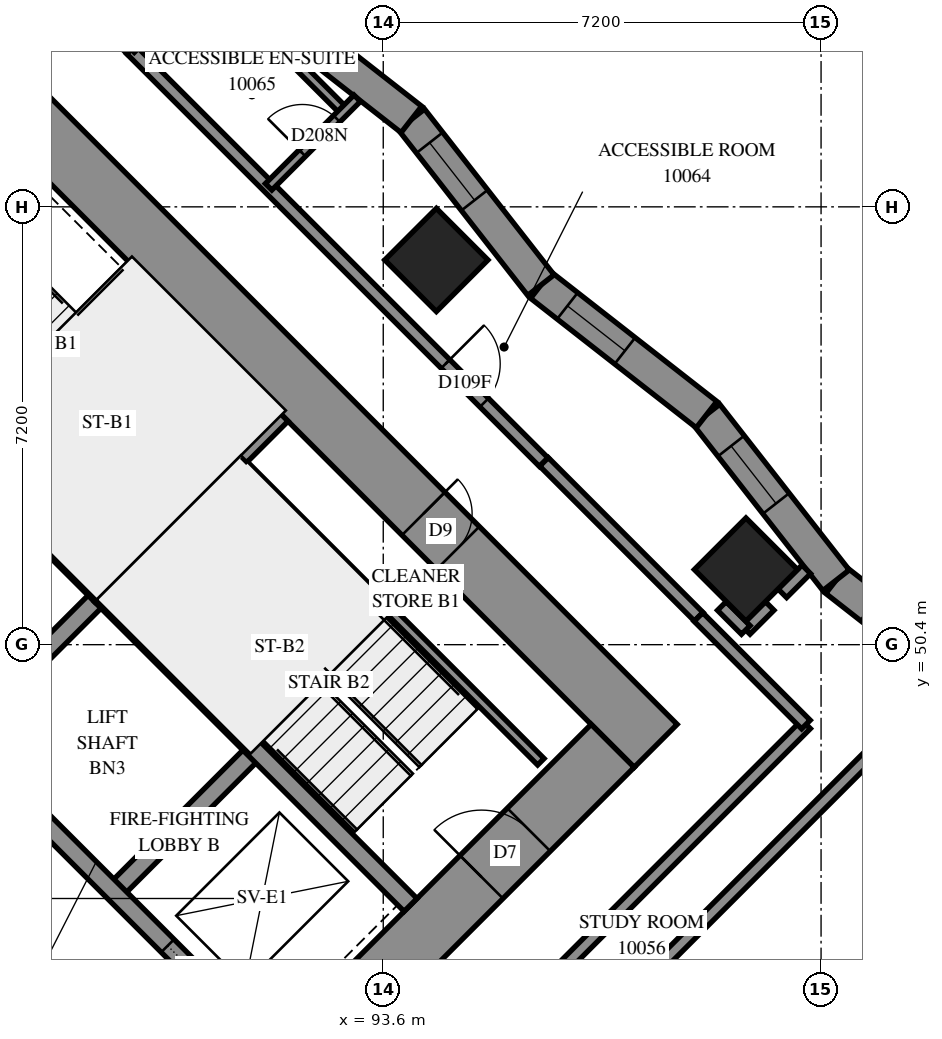
"""IFC4 building model, lengths in metres.
Left out: names, types, materials, properties, quantities, classifications, styles, units other than length and angle.
Written with IfcOpenShell. Run it as: python <this file> out.ifc"""

import sys

from ifc_helpers import new_model, si_unit, direction, frame, frame_2d, origin, origin_2d, place, context, subcontext, project, spatial, polyline, rectangle, outline, extrude, element, fill, save


model = new_model("IFC4")
c1 = context("Model", 3, precision=1e-05, world=origin(), true_north=direction((0.0, 1.0)))
c2 = subcontext(c1, "Body", "Model", "MODEL_VIEW")
j1 = project(units=[si_unit("LENGTHUNIT", "METRE"), si_unit("PLANEANGLEUNIT", "RADIAN")], contexts=[c1])
p1 = place(None, origin())
s1 = spatial("IfcSite", under=j1, at=p1, CompositionType="ELEMENT")
p2 = place(p1, origin())
s2 = spatial("IfcBuilding", under=s1, at=p2, CompositionType="ELEMENT")
p3 = place(p2, frame((0.0, 0.0, 40.6)))
s3 = spatial("IfcBuildingStorey", under=s2, at=p3, CompositionType="ELEMENT", Elevation=40.6)
for number, where, z_axis, x_axis in (
    (1, (94.474, 56.727, 0.0), (0.0, 0.0, 1.0), (0.707, -0.707, 0.0)),
    (2, (99.565, 51.635, 0.0), (0.0, 0.0, 1.0), (0.707, -0.707, 0.0)),
):
    element("IfcColumn", number, at=place(p3, frame(where, z_axis=z_axis, x_axis=x_axis)), inside=s3, PredefinedType="COLUMN", context=c2, shape_type="SweptSolid", body=[
        extrude(rectangle(XDim=1.2, YDim=1.2, at=origin_2d()), origin(), (0.0, 0.0, 1.0), 3.1),
    ])
p4 = place(p3, frame((86.483, 60.333, -0.3), z_axis=(0.0, 0.0, 1.0), x_axis=(0.70710983, -0.7071037324, 0.0)))
e3 = element("IfcWall", 3, at=p4, inside=s3, PredefinedType="SHEAR", context=c2, shape_type="SweptSolid", body=[
    extrude(rectangle(XDim=16.4, YDim=1.0, at=frame_2d((8.2, 0.0))), origin(), (0.0, 0.0, 1.0), 2.7),
])
p5 = place(p4, frame((11.0, 0.0, 0.3)))
e4 = element("IfcOpeningElement", 4, at=p5, cuts=e3, PredefinedType="OPENING", context=c2, shape_type="SweptSolid", body=[
    extrude(rectangle(XDim=0.8, YDim=2.1, at=frame_2d((0.4, 1.05))), frame((0.0, 0.51, 0.0), z_axis=(0.0, -1.0, 0.0), x_axis=(1.0, 0.0, 0.0)), (0.0, 0.0, 1.0), 1.02),
])
p6 = place(p3, frame((87.19, 38.554, -0.3), z_axis=(0.0, 0.0, 1.0), x_axis=(0.707103309, 0.7071102534, 0.0)))
e5 = element("IfcWall", 5, at=p6, inside=s3, PredefinedType="SHEAR", context=c2, shape_type="SweptSolid", body=[
    extrude(rectangle(XDim=14.4, YDim=1.0, at=frame_2d((7.2, 0.0))), origin(), (0.0, 0.0, 1.0), 2.7),
])
p7 = place(p6, frame((4.55, 0.0, 0.3)))
e6 = element("IfcOpeningElement", 6, at=p7, cuts=e5, PredefinedType="OPENING", context=c2, shape_type="SweptSolid", body=[
    extrude(rectangle(XDim=1.1, YDim=2.1, at=frame_2d((0.55, 1.05))), frame((0.0, 0.51, 0.0), z_axis=(0.0, -1.0, 0.0), x_axis=(1.0, 0.0, 0.0)), (0.0, 0.0, 1.0), 1.02),
])
p8 = place(p6, frame((11.35, 0.0, 0.3)))
e7 = element("IfcOpeningElement", 7, at=p8, cuts=e5, PredefinedType="OPENING", context=c2, shape_type="SweptSolid", body=[
    extrude(rectangle(XDim=1.1, YDim=2.1, at=frame_2d((0.55, 1.05))), frame((0.0, 0.51, 0.0), z_axis=(0.0, -1.0, 0.0), x_axis=(1.0, 0.0, 0.0)), (0.0, 0.0, 1.0), 1.02),
])
for number, where, z_axis, x_axis in (
    (8, (86.625, 48.878, 0.0), (0.0, 0.0, 1.0), (0.707, 0.707, 0.0)),
    (9, (89.17, 46.332, 0.0), (0.0, 0.0, 1.0), (0.707, 0.707, 0.0)),
):
    element("IfcWall", number, at=place(p3, frame(where, z_axis=z_axis, x_axis=x_axis)), inside=s3, PredefinedType="SOLIDWALL", context=c2, shape_type="SweptSolid", body=[
        extrude(rectangle(XDim=3.3, YDim=0.3, at=frame_2d((1.65, 0.0))), origin(), (0.0, 0.0, 1.0), 3.1),
    ])
p9 = place(p3, frame((78.988, 51.423, 0.0), z_axis=(0.0, 0.0, 1.0), x_axis=(0.7071067812, -0.7071067812, 0.0)))
e10 = element("IfcWall", 10, at=p9, inside=s3, PredefinedType="SOLIDWALL", context=c2, shape_type="SweptSolid", body=[
    extrude(rectangle(XDim=14.4, YDim=0.3, at=frame_2d((7.2, 0.0))), origin(), (0.0, 0.0, 1.0), 3.1),
])
p10 = place(p9, frame((1.25, 0.0, 0.0)))
e11 = element("IfcOpeningElement", 11, at=p10, cuts=e10, PredefinedType="OPENING", context=c2, shape_type="SweptSolid", body=[
    extrude(rectangle(XDim=1.1, YDim=2.1, at=frame_2d((0.55, 1.05))), frame((0.0, 0.16, 0.0), z_axis=(0.0, -1.0, 0.0), x_axis=(1.0, 0.0, 0.0)), (0.0, 0.0, 1.0), 0.32),
])
p11 = place(p9, frame((4.85, 0.0, 0.0)))
e12 = element("IfcOpeningElement", 12, at=p11, cuts=e10, PredefinedType="OPENING", context=c2, shape_type="SweptSolid", body=[
    extrude(rectangle(XDim=1.1, YDim=2.1, at=frame_2d((0.55, 1.05))), frame((0.0, 0.16, 0.0), z_axis=(0.0, -1.0, 0.0), x_axis=(1.0, 0.0, 0.0)), (0.0, 0.0, 1.0), 0.32),
])
p12 = place(p9, frame((8.45, 0.0, 0.0)))
e13 = element("IfcOpeningElement", 13, at=p12, cuts=e10, PredefinedType="OPENING", context=c2, shape_type="SweptSolid", body=[
    extrude(rectangle(XDim=1.1, YDim=2.1, at=frame_2d((0.55, 1.05))), frame((0.0, 0.16, 0.0), z_axis=(0.0, -1.0, 0.0), x_axis=(1.0, 0.0, 0.0)), (0.0, 0.0, 1.0), 0.32),
])
p13 = place(p9, frame((12.05, 0.0, 0.0)))
e14 = element("IfcOpeningElement", 14, at=p13, cuts=e10, PredefinedType="OPENING", context=c2, shape_type="SweptSolid", body=[
    extrude(rectangle(XDim=1.1, YDim=2.1, at=frame_2d((0.55, 1.05))), frame((0.0, 0.16, 0.0), z_axis=(0.0, -1.0, 0.0), x_axis=(1.0, 0.0, 0.0)), (0.0, 0.0, 1.0), 0.32),
])
p14 = place(p3, frame((81.534, 53.969, 0.0), z_axis=(0.0, 0.0, 1.0), x_axis=(0.707103309, -0.7071102534, 0.0)))
e15 = element("IfcWall", 15, at=p14, inside=s3, PredefinedType="SOLIDWALL", context=c2, shape_type="SweptSolid", body=[
    extrude(rectangle(XDim=14.4, YDim=0.3, at=frame_2d((7.2, 0.0))), origin(), (0.0, 0.0, 1.0), 3.1),
])
p15 = place(p14, frame((12.05, 0.0, 0.0)))
e16 = element("IfcOpeningElement", 16, at=p15, cuts=e15, PredefinedType="OPENING", context=c2, shape_type="SweptSolid", body=[
    extrude(rectangle(XDim=1.1, YDim=2.1, at=frame_2d((0.55, 1.05))), frame((0.0, 0.16, 0.0), z_axis=(0.0, -1.0, 0.0), x_axis=(1.0, 0.0, 0.0)), (0.0, 0.0, 1.0), 0.32),
])
for number, where, z_axis, x_axis in (
    (17, (83.867, 56.302, 0.0), (0.0, 0.0, 1.0), (0.707, -0.707, 0.0)),
    (18, (88.958, 51.211, 0.0), (0.0, 0.0, 1.0), (0.707, -0.707, 0.0)),
):
    element("IfcWall", number, at=place(p3, frame(where, z_axis=z_axis, x_axis=x_axis)), inside=s3, PredefinedType="SOLIDWALL", context=c2, shape_type="SweptSolid", body=[
        extrude(rectangle(XDim=7.2, YDim=0.3, at=frame_2d((3.6, 0.0))), origin(), (0.0, 0.0, 1.0), 3.1),
    ])
p16 = place(p3, frame((88.958, 51.211, 0.0), z_axis=(0.0, 0.0, 1.0), x_axis=(0.7071067812, 0.7071067812, 0.0)))
e19 = element("IfcWall", 19, at=p16, inside=s3, PredefinedType="SOLIDWALL", context=c2, shape_type="SweptSolid", body=[
    extrude(rectangle(XDim=4.2, YDim=0.3, at=frame_2d((2.1, 0.0))), origin(), (0.0, 0.0, 1.0), 3.1),
])
p17 = place(p3, frame((103.771, 49.329, 0.0), z_axis=(0.0, 0.0, 1.0), x_axis=(-0.7879191472, 0.6157787082, 0.0)))
e20 = element("IfcWall", 20, at=p17, inside=s3, PredefinedType="SOLIDWALL", context=c2, shape_type="SweptSolid", body=[
    extrude(outline(polyline([(-0.034, -0.275), (3.425, -0.275), (3.492, 0.275), (0.034, 0.275), (-0.034, -0.275)])), origin(), (0.0, 0.0, 1.0), 3.1),
])
p18 = place(p17, frame((1.535, 0.0, 0.5)))
e21 = element("IfcOpeningElement", 21, at=p18, cuts=e20, PredefinedType="OPENING", context=c2, shape_type="SweptSolid", body=[
    extrude(rectangle(XDim=1.2, YDim=2.45, at=frame_2d((0.6, 1.225))), frame((0.0, 0.285, 0.0), z_axis=(0.0, -1.0, 0.0), x_axis=(1.0, 0.0, 0.0)), (0.0, 0.0, 1.0), 0.57),
])
p19 = place(p3, frame((101.046, 51.459, 0.0), z_axis=(0.0, 0.0, 1.0), x_axis=(-0.6157607558, 0.7879331771, 0.0)))
e22 = element("IfcWall", 22, at=p19, inside=s3, PredefinedType="SOLIDWALL", context=c2, shape_type="SweptSolid", body=[
    extrude(outline(polyline([(0.034, -0.275), (3.492, -0.275), (3.425, 0.275), (-0.034, 0.275), (0.034, -0.275)])), origin(), (0.0, 0.0, 1.0), 3.1),
])
p20 = place(p19, frame((1.603, 0.0, 0.5)))
e23 = element("IfcOpeningElement", 23, at=p20, cuts=e22, PredefinedType="OPENING", context=c2, shape_type="SweptSolid", body=[
    extrude(rectangle(XDim=1.2, YDim=2.45, at=frame_2d((0.6, 1.225))), frame((0.0, 0.285, 0.0), z_axis=(0.0, -1.0, 0.0), x_axis=(1.0, 0.0, 0.0)), (0.0, 0.0, 1.0), 0.57),
])
p21 = place(p3, frame((98.917, 54.184, 0.0), z_axis=(0.0, 0.0, 1.0), x_axis=(-0.7879301115, 0.6157646785, 0.0)))
e24 = element("IfcWall", 24, at=p21, inside=s3, PredefinedType="SOLIDWALL", context=c2, shape_type="SweptSolid", body=[
    extrude(outline(polyline([(-0.034, -0.275), (3.425, -0.275), (3.492, 0.275), (0.034, 0.275), (-0.034, -0.275)])), origin(), (0.0, 0.0, 1.0), 3.1),
])
p22 = place(p21, frame((1.704, 0.0, 0.5)))
e25 = element("IfcOpeningElement", 25, at=p22, cuts=e24, PredefinedType="OPENING", context=c2, shape_type="SweptSolid", body=[
    extrude(rectangle(XDim=1.2, YDim=2.45, at=frame_2d((0.6, 1.225))), frame((0.0, 0.285, 0.0), z_axis=(0.0, -1.0, 0.0), x_axis=(1.0, 0.0, 0.0)), (0.0, 0.0, 1.0), 0.57),
])
p23 = place(p3, frame((96.192, 56.313, 0.0), z_axis=(0.0, 0.0, 1.0), x_axis=(-0.6157607558, 0.7879331771, 0.0)))
e26 = element("IfcWall", 26, at=p23, inside=s3, PredefinedType="SOLIDWALL", context=c2, shape_type="SweptSolid", body=[
    extrude(outline(polyline([(0.034, -0.275), (3.492, -0.275), (3.425, 0.275), (-0.034, 0.275), (0.034, -0.275)])), origin(), (0.0, 0.0, 1.0), 3.1),
])
p24 = place(p23, frame((1.772, 0.0, 0.5)))
e27 = element("IfcOpeningElement", 27, at=p24, cuts=e26, PredefinedType="OPENING", context=c2, shape_type="SweptSolid", body=[
    extrude(rectangle(XDim=1.2, YDim=2.45, at=frame_2d((0.6, 1.225))), frame((0.0, 0.285, 0.0), z_axis=(0.0, -1.0, 0.0), x_axis=(1.0, 0.0, 0.0)), (0.0, 0.0, 1.0), 0.57),
])
p25 = place(p3, frame((94.063, 59.038, 0.0), z_axis=(0.0, 0.0, 1.0), x_axis=(-0.787944141, 0.6157467261, 0.0)))
e28 = element("IfcWall", 28, at=p25, inside=s3, PredefinedType="SOLIDWALL", context=c2, shape_type="SweptSolid", body=[
    extrude(outline(polyline([(-0.034, -0.275), (3.425, -0.275), (3.492, 0.275), (0.034, 0.275), (-0.034, -0.275)])), origin(), (0.0, 0.0, 1.0), 3.1),
])
p26 = place(p25, frame((1.873, 0.0, 0.5)))
e29 = element("IfcOpeningElement", 29, at=p26, cuts=e28, PredefinedType="OPENING", context=c2, shape_type="SweptSolid", body=[
    extrude(rectangle(XDim=1.2, YDim=2.45, at=frame_2d((0.6, 1.225))), frame((0.0, 0.285, 0.0), z_axis=(0.0, -1.0, 0.0), x_axis=(1.0, 0.0, 0.0)), (0.0, 0.0, 1.0), 0.57),
])
p27 = place(p3, frame((91.313, 53.354, 0.0), z_axis=(0.0, 0.0, 1.0), x_axis=(0.7071140275, -0.7070995348, 0.0)))
e30 = element("IfcWall", 30, at=p27, inside=s3, PredefinedType="PARTITIONING", context=c2, shape_type="SweptSolid", body=[
    extrude(rectangle(XDim=6.9, YDim=0.15, at=frame_2d((3.45, 0.0))), origin(), (0.0, 0.0, 1.0), 3.1),
])
p28 = place(p3, frame((94.367, 41.349, 0.0), z_axis=(0.0, 0.0, 1.0), x_axis=(0.7071109856, 0.7071025768, 0.0)))
e31 = element("IfcWall", 31, at=p28, inside=s3, PredefinedType="PARTITIONING", context=c2, shape_type="SweptSolid", body=[
    extrude(rectangle(XDim=11.892, YDim=0.2, at=frame_2d((5.946, 0.0))), origin(), (0.0, 0.0, 1.0), 3.1),
])
p29 = place(p3, frame((93.59, 42.126, 0.0), z_axis=(0.0, 0.0, 1.0), x_axis=(0.7071067812, 0.7071067812, 0.0)))
e32 = element("IfcWall", 32, at=p29, inside=s3, PredefinedType="PARTITIONING", context=c2, shape_type="SweptSolid", body=[
    extrude(rectangle(XDim=9.849, YDim=0.2, at=frame_2d((4.924, 0.0))), origin(), (0.0, 0.0, 1.0), 3.1),
])
p30 = place(p29, frame((0.148, 0.0, 0.0)))
e33 = element("IfcOpeningElement", 33, at=p30, cuts=e32, PredefinedType="OPENING", context=c2, shape_type="SweptSolid", body=[
    extrude(rectangle(XDim=1.0, YDim=2.1, at=frame_2d((0.5, 1.05))), frame((0.0, 0.11, 0.0), z_axis=(0.0, -1.0, 0.0), x_axis=(1.0, 0.0, 0.0)), (0.0, 0.0, 1.0), 0.22),
])
p31 = place(p3, frame((89.451, 60.189, 0.0), z_axis=(0.0, 0.0, 1.0), x_axis=(0.7071796965, -0.7070338583, 0.0)))
e34 = element("IfcWall", 34, at=p31, inside=s3, PredefinedType="PARTITIONING", context=c2, shape_type="SweptSolid", body=[
    extrude(rectangle(XDim=9.6, YDim=0.2, at=frame_2d((4.8, 0.0))), origin(), (0.0, 0.0, 1.0), 3.1),
])
p32 = place(p31, frame((7.315, 0.0, 0.0)))
e35 = element("IfcOpeningElement", 35, at=p32, cuts=e34, PredefinedType="OPENING", context=c2, shape_type="SweptSolid", body=[
    extrude(rectangle(XDim=0.9, YDim=2.1, at=frame_2d((0.45, 1.05))), frame((0.0, 0.11, 0.0), z_axis=(0.0, -1.0, 0.0), x_axis=(1.0, 0.0, 0.0)), (0.0, 0.0, 1.0), 0.22),
])
p33 = place(p3, frame((96.244, 53.406, 0.0), z_axis=(0.0, 0.0, 1.0), x_axis=(0.7068288851, -0.7073845681, 0.0)))
e36 = element("IfcWall", 36, at=p33, inside=s3, PredefinedType="PARTITIONING", context=c2, shape_type="SweptSolid", body=[
    extrude(rectangle(XDim=3.599, YDim=0.2, at=frame_2d((1.8, 0.0))), origin(), (0.0, 0.0, 1.0), 3.1),
])
p34 = place(p3, frame((98.783, 50.855, 0.0), z_axis=(0.0, 0.0, 1.0), x_axis=(0.7071067812, -0.7071067812, 0.0)))
e37 = element("IfcWall", 37, at=p34, inside=s3, PredefinedType="PARTITIONING", context=c2, shape_type="SweptSolid", body=[
    extrude(rectangle(XDim=2.5, YDim=0.2, at=frame_2d((1.25, 0.0))), origin(), (0.0, 0.0, 1.0), 3.1),
])
p35 = place(p3, frame((91.239, 60.888, 0.0), z_axis=(0.0, 0.0, 1.0), x_axis=(0.7071067812, -0.7071067812, 0.0)))
e38 = element("IfcWall", 38, at=p35, inside=s3, PredefinedType="PARTITIONING", context=c2, shape_type="SweptSolid", body=[
    extrude(rectangle(XDim=2.43, YDim=0.15, at=frame_2d((1.215, 0.0))), origin(), (0.0, 0.0, 1.0), 3.1),
])
p36 = place(p3, frame((91.715, 57.929, 0.0), z_axis=(0.0, 0.0, 1.0), x_axis=(0.7071067812, 0.7071067812, 0.0)))
e39 = element("IfcWall", 39, at=p36, inside=s3, PredefinedType="PARTITIONING", context=c2, shape_type="SweptSolid", body=[
    extrude(rectangle(XDim=2.06, YDim=0.15, at=frame_2d((1.03, 0.0))), origin(), (0.0, 0.0, 1.0), 3.1),
])
p37 = place(p36, frame((0.784, 0.0, 0.0)))
e40 = element("IfcOpeningElement", 40, at=p37, cuts=e39, PredefinedType="OPENING", context=c2, shape_type="SweptSolid", body=[
    extrude(rectangle(XDim=0.8, YDim=2.1, at=frame_2d((0.4, 1.05))), frame((0.0, 0.085, 0.0), z_axis=(0.0, -1.0, 0.0), x_axis=(1.0, 0.0, 0.0)), (0.0, 0.0, 1.0), 0.17),
])
p38 = place(p3, frame((88.603, 61.039, 0.0), z_axis=(0.0, 0.0, 1.0), x_axis=(0.7079391603, -0.7062734211, 0.0)))
e41 = element("IfcWall", 41, at=p38, inside=s3, PredefinedType="PARTITIONING", context=c2, shape_type="SweptSolid", body=[
    extrude(rectangle(XDim=1.201, YDim=0.2, at=frame_2d((0.6, 0.0))), origin(), (0.0, 0.0, 1.0), 3.1),
])
for number, where, z_axis, x_axis in (
    (42, (99.561, 50.643, 0.0), (0.0, 0.0, 1.0), (0.707, 0.707, 0.0)),
    (43, (99.168, 51.036, 0.0), (0.0, 0.0, 1.0), (0.707, -0.707, 0.0)),
):
    element("IfcWall", number, at=place(p3, frame(where, z_axis=z_axis, x_axis=x_axis)), inside=s3, PredefinedType="PARTITIONING", context=c2, shape_type="SweptSolid", body=[
        extrude(rectangle(XDim=0.557, YDim=0.2, at=frame_2d((0.279, 0.0))), origin(), (0.0, 0.0, 1.0), 3.1),
    ])
p39 = place(p3, frame((100.163, 51.245, 0.0), z_axis=(0.0, 0.0, 1.0), x_axis=(0.7071067812, 0.7071067812, 0.0)))
e44 = element("IfcWall", 44, at=p39, inside=s3, PredefinedType="PARTITIONING", context=c2, shape_type="SweptSolid", body=[
    extrude(rectangle(XDim=0.557, YDim=0.2, at=frame_2d((0.278, 0.0))), origin(), (0.0, 0.0, 1.0), 3.1),
])
p40 = place(p20, origin())
e45 = element("IfcWindow", 45, at=p40, inside=s3, PartitioningType="SINGLE_PANEL", PredefinedType="WINDOW", context=c2, shape_type="SweptSolid", body=[
    extrude(rectangle(XDim=1.2, YDim=2.45, at=frame_2d((0.6, 1.225))), frame((0.0, 0.155, 0.0), z_axis=(0.0, -1.0, 0.0), x_axis=(1.0, 0.0, 0.0)), (0.0, 0.0, 1.0), 0.06),
])
fill(e23, e45)
p41 = place(p22, origin())
e46 = element("IfcWindow", 46, at=p41, inside=s3, PartitioningType="SINGLE_PANEL", PredefinedType="WINDOW", context=c2, shape_type="SweptSolid", body=[
    extrude(rectangle(XDim=1.2, YDim=2.45, at=frame_2d((0.6, 1.225))), frame((0.0, 0.155, 0.0), z_axis=(0.0, -1.0, 0.0), x_axis=(1.0, 0.0, 0.0)), (0.0, 0.0, 1.0), 0.06),
])
fill(e25, e46)
p42 = place(p24, origin())
e47 = element("IfcWindow", 47, at=p42, inside=s3, PartitioningType="SINGLE_PANEL", PredefinedType="WINDOW", context=c2, shape_type="SweptSolid", body=[
    extrude(rectangle(XDim=1.2, YDim=2.45, at=frame_2d((0.6, 1.225))), frame((0.0, 0.155, 0.0), z_axis=(0.0, -1.0, 0.0), x_axis=(1.0, 0.0, 0.0)), (0.0, 0.0, 1.0), 0.06),
])
fill(e27, e47)
p43 = place(p26, origin())
e48 = element("IfcWindow", 48, at=p43, inside=s3, PartitioningType="SINGLE_PANEL", PredefinedType="WINDOW", context=c2, shape_type="SweptSolid", body=[
    extrude(rectangle(XDim=1.2, YDim=2.45, at=frame_2d((0.6, 1.225))), frame((0.0, 0.155, 0.0), z_axis=(0.0, -1.0, 0.0), x_axis=(1.0, 0.0, 0.0)), (0.0, 0.0, 1.0), 0.06),
])
fill(e29, e48)
p44 = place(p5, origin())
e49 = element("IfcDoor", 49, at=p44, inside=s3, OperationType="SINGLE_SWING_RIGHT", PredefinedType="DOOR", context=c2, shape_type="SweptSolid", body=[
    extrude(rectangle(XDim=0.8, YDim=2.1, at=frame_2d((0.4, 1.05))), frame((0.0, -0.44, 0.0), z_axis=(0.0, -1.0, 0.0), x_axis=(1.0, 0.0, 0.0)), (0.0, 0.0, 1.0), 0.05),
])
fill(e4, e49)
p45 = place(p8, origin())
e50 = element("IfcDoor", 50, at=p45, inside=s3, OperationType="SINGLE_SWING_RIGHT", PredefinedType="DOOR", context=c2, shape_type="SweptSolid", body=[
    extrude(rectangle(XDim=1.1, YDim=2.1, at=frame_2d((0.55, 1.05))), frame((0.0, 0.025, 0.0), z_axis=(0.0, -1.0, 0.0), x_axis=(1.0, 0.0, 0.0)), (0.0, 0.0, 1.0), 0.05),
])
fill(e7, e50)
p46 = place(p15, origin())
e51 = element("IfcDoor", 51, at=p46, inside=s3, OperationType="SLIDING_TO_RIGHT", PredefinedType="DOOR", context=c2, shape_type="SweptSolid", body=[
    extrude(rectangle(XDim=1.1, YDim=2.1, at=frame_2d((0.55, 1.05))), frame((0.0, 0.025, 0.0), z_axis=(0.0, -1.0, 0.0), x_axis=(1.0, 0.0, 0.0)), (0.0, 0.0, 1.0), 0.05),
])
fill(e16, e51)
p47 = place(p32, origin())
e52 = element("IfcDoor", 52, at=p47, inside=s3, OperationType="SINGLE_SWING_LEFT", PredefinedType="DOOR", context=c2, shape_type="SweptSolid", body=[
    extrude(rectangle(XDim=0.9, YDim=2.1, at=frame_2d((0.45, 1.05))), frame((0.0, 0.025, 0.0), z_axis=(0.0, -1.0, 0.0), x_axis=(1.0, 0.0, 0.0)), (0.0, 0.0, 1.0), 0.05),
])
fill(e35, e52)
p48 = place(p37, origin())
e53 = element("IfcDoor", 53, at=p48, inside=s3, OperationType="SINGLE_SWING_RIGHT", PredefinedType="DOOR", context=c2, shape_type="SweptSolid", body=[
    extrude(rectangle(XDim=0.8, YDim=2.1, at=frame_2d((0.4, 1.05))), frame((0.0, 0.025, 0.0), z_axis=(0.0, -1.0, 0.0), x_axis=(1.0, 0.0, 0.0)), (0.0, 0.0, 1.0), 0.05),
])
fill(e40, e53)
save(model, sys.argv[1])
